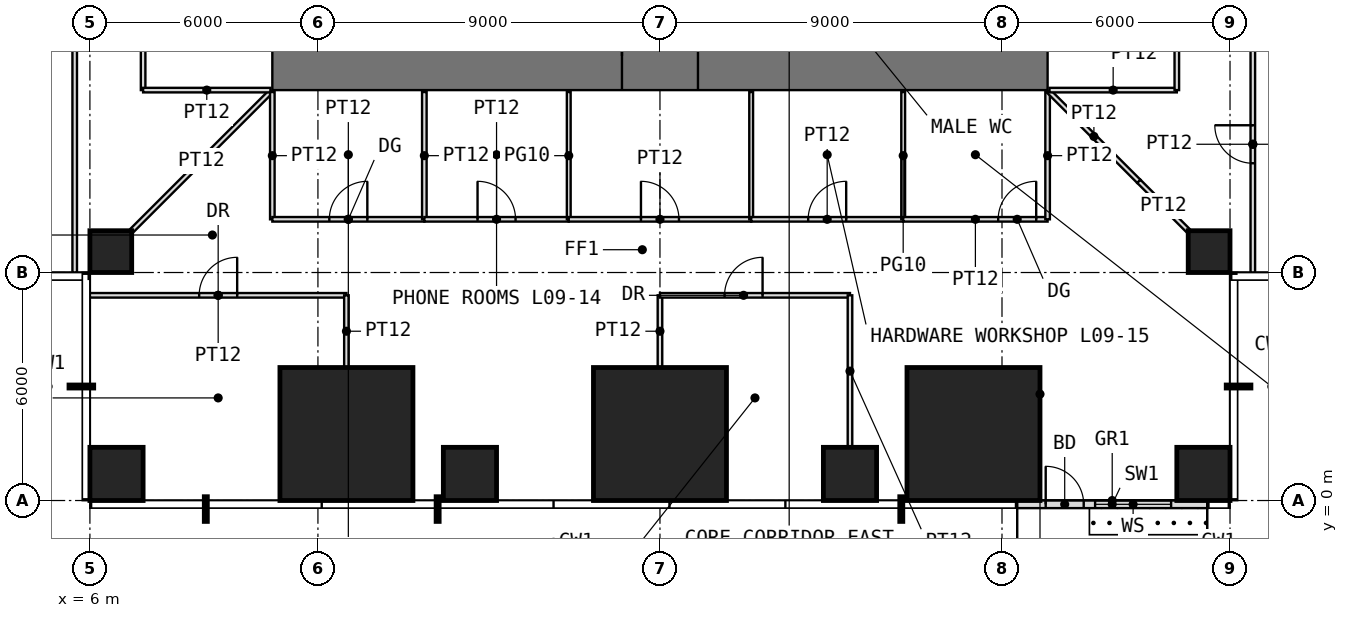
"""IFC4 building model, lengths in metres.
Left out: names, types, materials, properties, quantities, classifications, styles, units other than length and angle.
Written with IfcOpenShell. Run it as: python <this file> out.ifc"""

import sys

from ifc_helpers import new_model, si_unit, direction, frame, frame_2d, origin, origin_2d, place, context, subcontext, project, spatial, rectangle, extrude, element, fill, save


model = new_model("IFC4")
c1 = context("Model", 3, precision=1e-05, world=origin(), true_north=direction((0.0, 1.0)))
c2 = subcontext(c1, "Body", "Model", "MODEL_VIEW")
j1 = project(units=[si_unit("LENGTHUNIT", "METRE"), si_unit("PLANEANGLEUNIT", "RADIAN")], contexts=[c1])
p1 = place(None, origin())
s1 = spatial("IfcSite", under=j1, at=p1, CompositionType="ELEMENT")
p2 = place(p1, origin())
s2 = spatial("IfcBuilding", under=s1, at=p2, CompositionType="ELEMENT")
p3 = place(p2, frame((0.0, 0.0, 42.5)))
s3 = spatial("IfcBuildingStorey", under=s2, at=p3, CompositionType="ELEMENT", Elevation=42.5)
p4 = place(p3, frame((6.7, 0.7, 0.0), z_axis=(0.0, 0.0, 1.0), x_axis=(1.0, 0.0, 0.0)))
e1 = element("IfcColumn", 1, at=p4, inside=s3, PredefinedType="COLUMN", context=c2, shape_type="SweptSolid", body=[
    extrude(rectangle(XDim=1.4, YDim=1.4, at=origin_2d()), origin(), (0.0, 0.0, 1.0), 4.0),
])
p5 = place(p3, frame((12.75, 1.75, 0.0), z_axis=(0.0, 0.0, 1.0), x_axis=(1.0, 0.0, 0.0)))
e2 = element("IfcColumn", 2, at=p5, inside=s3, PredefinedType="COLUMN", context=c2, shape_type="SweptSolid", body=[
    extrude(rectangle(XDim=3.5, YDim=3.5, at=origin_2d()), origin(), (0.0, 0.0, 1.0), 4.0),
])
p6 = place(p3, frame((16.0, 0.7, 0.0), z_axis=(0.0, 0.0, 1.0), x_axis=(1.0, 0.0, 0.0)))
e3 = element("IfcColumn", 3, at=p6, inside=s3, PredefinedType="COLUMN", context=c2, shape_type="SweptSolid", body=[
    extrude(rectangle(XDim=1.4, YDim=1.4, at=origin_2d()), origin(), (0.0, 0.0, 1.0), 4.0),
])
p7 = place(p3, frame((21.0, 1.75, 0.0), z_axis=(0.0, 0.0, 1.0), x_axis=(1.0, 0.0, 0.0)))
e4 = element("IfcColumn", 4, at=p7, inside=s3, PredefinedType="COLUMN", context=c2, shape_type="SweptSolid", body=[
    extrude(rectangle(XDim=3.5, YDim=3.5, at=origin_2d()), origin(), (0.0, 0.0, 1.0), 4.0),
])
p8 = place(p3, frame((26.0, 0.7, 0.0), z_axis=(0.0, 0.0, 1.0), x_axis=(1.0, 0.0, 0.0)))
e5 = element("IfcColumn", 5, at=p8, inside=s3, PredefinedType="COLUMN", context=c2, shape_type="SweptSolid", body=[
    extrude(rectangle(XDim=1.4, YDim=1.4, at=origin_2d()), origin(), (0.0, 0.0, 1.0), 4.0),
])
p9 = place(p3, frame((29.25, 1.75, 0.0), z_axis=(0.0, 0.0, 1.0), x_axis=(1.0, 0.0, 0.0)))
e6 = element("IfcColumn", 6, at=p9, inside=s3, PredefinedType="COLUMN", context=c2, shape_type="SweptSolid", body=[
    extrude(rectangle(XDim=3.5, YDim=3.5, at=origin_2d()), origin(), (0.0, 0.0, 1.0), 4.0),
])
p10 = place(p3, frame((35.3, 0.7, 0.0), z_axis=(0.0, 0.0, 1.0), x_axis=(1.0, 0.0, 0.0)))
e7 = element("IfcColumn", 7, at=p10, inside=s3, PredefinedType="COLUMN", context=c2, shape_type="SweptSolid", body=[
    extrude(rectangle(XDim=1.4, YDim=1.4, at=origin_2d()), origin(), (0.0, 0.0, 1.0), 4.0),
])
for number, where, z_axis, x_axis in (
    (8, (6.55, 6.55, 0.0), (0.0, 0.0, 1.0), (1.0, 0.0, 0.0)),
    (9, (35.45, 6.55, 0.0), (0.0, 0.0, 1.0), (1.0, 0.0, 0.0)),
):
    element("IfcColumn", number, at=place(p3, frame(where, z_axis=z_axis, x_axis=x_axis)), inside=s3, PredefinedType="COLUMN", context=c2, shape_type="SweptSolid", body=[
        extrude(rectangle(XDim=1.1, YDim=1.1, at=origin_2d()), origin(), (0.0, 0.0, 1.0), 4.0),
    ])
p11 = place(p3, frame((30.4, -0.1, 0.0), z_axis=(0.0, 0.0, 1.0), x_axis=(1.0, 0.0, 0.0)))
e10 = element("IfcWall", 10, at=p11, inside=s3, PredefinedType="USERDEFINED", context=c2, shape_type="SweptSolid", body=[
    extrude(rectangle(XDim=5.0, YDim=0.2, at=frame_2d((2.5, 0.0))), origin(), (0.0, 0.0, 1.0), 3.75),
])
p12 = place(p11, frame((0.75, 0.0, 0.0)))
e11 = element("IfcOpeningElement", 11, at=p12, cuts=e10, PredefinedType="OPENING", context=c2, shape_type="SweptSolid", body=[
    extrude(rectangle(XDim=1.0, YDim=2.4, at=frame_2d((0.5, 1.2))), frame((0.0, 0.11, 0.0), z_axis=(0.0, -1.0, 0.0), x_axis=(1.0, 0.0, 0.0)), (0.0, 0.0, 1.0), 0.22),
])
p13 = place(p11, frame((2.05, 0.0, 0.3)))
e12 = element("IfcOpeningElement", 12, at=p13, cuts=e10, PredefinedType="OPENING", context=c2, shape_type="SweptSolid", body=[
    extrude(rectangle(XDim=2.0, YDim=2.7, at=frame_2d((1.0, 1.35))), frame((0.0, 0.11, 0.0), z_axis=(0.0, -1.0, 0.0), x_axis=(1.0, 0.0, 0.0)), (0.0, 0.0, 1.0), 0.22),
])
p14 = place(p3, frame((10.8, 11.7, -0.05), z_axis=(0.0, 0.0, 1.0), x_axis=(1.0, 0.0, 0.0)))
e13 = element("IfcWall", 13, at=p14, inside=s3, PredefinedType="SHEAR", context=c2, shape_type="SweptSolid", body=[
    extrude(rectangle(XDim=20.4, YDim=1.8, at=frame_2d((10.2, 0.0))), origin(), (0.0, 0.0, 1.0), 4.0),
])
p15 = place(p14, frame((9.2, 0.0, 0.05)))
e14 = element("IfcOpeningElement", 14, at=p15, cuts=e13, PredefinedType="OPENING", context=c2, shape_type="SweptSolid", body=[
    extrude(rectangle(XDim=2.0, YDim=2.2, at=frame_2d((1.0, 1.1))), frame((0.0, 0.91, 0.0), z_axis=(0.0, -1.0, 0.0), x_axis=(1.0, 0.0, 0.0)), (0.0, 0.0, 1.0), 1.82),
])
p16 = place(p3, frame((5.6, 6.0, 0.0), z_axis=(0.0, 0.0, 1.0), x_axis=(0.0, 1.0, 0.0)))
e15 = element("IfcWall", 15, at=p16, inside=s3, PredefinedType="PARTITIONING", context=c2, shape_type="SweptSolid", body=[
    extrude(rectangle(XDim=30.0, YDim=0.12, at=frame_2d((15.0, 0.0))), origin(), (0.0, 0.0, 1.0), 3.75),
])
p17 = place(p16, frame((14.5, 0.0, 0.0)))
e16 = element("IfcOpeningElement", 16, at=p17, cuts=e15, PredefinedType="OPENING", context=c2, shape_type="SweptSolid", body=[
    extrude(rectangle(XDim=1.0, YDim=2.4, at=frame_2d((0.5, 1.2))), frame((0.0, 0.07, 0.0), z_axis=(0.0, -1.0, 0.0), x_axis=(1.0, 0.0, 0.0)), (0.0, 0.0, 1.0), 0.14),
])
p18 = place(p3, frame((6.0, 5.4, 0.0), z_axis=(0.0, 0.0, 1.0), x_axis=(1.0, 0.0, 0.0)))
e17 = element("IfcWall", 17, at=p18, inside=s3, PredefinedType="PARTITIONING", context=c2, shape_type="SweptSolid", body=[
    extrude(rectangle(XDim=6.75, YDim=0.12, at=frame_2d((3.375, 0.0))), origin(), (0.0, 0.0, 1.0), 3.75),
])
p19 = place(p18, frame((2.875, 0.0, 0.0)))
e18 = element("IfcOpeningElement", 18, at=p19, cuts=e17, PredefinedType="OPENING", context=c2, shape_type="SweptSolid", body=[
    extrude(rectangle(XDim=1.0, YDim=2.2, at=frame_2d((0.5, 1.1))), frame((0.0, 0.07, 0.0), z_axis=(0.0, -1.0, 0.0), x_axis=(1.0, 0.0, 0.0)), (0.0, 0.0, 1.0), 0.14),
])
p20 = place(p3, frame((7.11, 7.11, 0.0), z_axis=(0.0, 0.0, 1.0), x_axis=(0.707106781187, 0.707106781187, 0.0)))
e19 = element("IfcWall", 19, at=p20, inside=s3, PredefinedType="PARTITIONING", context=c2, shape_type="SweptSolid", body=[
    extrude(rectangle(XDim=5.168, YDim=0.12, at=frame_2d((2.584, 0.0))), origin(), (0.0, 0.0, 1.0), 3.75),
])
p21 = place(p3, frame((7.4, 10.8, 0.0), z_axis=(0.0, 0.0, 1.0), x_axis=(0.0, 1.0, 0.0)))
e20 = element("IfcWall", 20, at=p21, inside=s3, PredefinedType="PARTITIONING", context=c2, shape_type="SweptSolid", body=[
    extrude(rectangle(XDim=4.8, YDim=0.12, at=frame_2d((2.4, 0.0))), origin(), (0.0, 0.0, 1.0), 3.75),
])
p22 = place(p21, frame((1.9, 0.0, 0.0)))
e21 = element("IfcOpeningElement", 21, at=p22, cuts=e20, PredefinedType="OPENING", context=c2, shape_type="SweptSolid", body=[
    extrude(rectangle(XDim=1.0, YDim=2.4, at=frame_2d((0.5, 1.2))), frame((0.0, 0.07, 0.0), z_axis=(0.0, -1.0, 0.0), x_axis=(1.0, 0.0, 0.0)), (0.0, 0.0, 1.0), 0.14),
])
for number, where, z_axis, x_axis in (
    (22, (7.4, 10.8, 0.0), (0.0, 0.0, 1.0), (1.0, 0.0, 0.0)),
    (23, (10.8, 7.4, 0.0), (0.0, 0.0, 1.0), (0.0, 1.0, 0.0)),
):
    element("IfcWall", number, at=place(p3, frame(where, z_axis=z_axis, x_axis=x_axis)), inside=s3, PredefinedType="PARTITIONING", context=c2, shape_type="SweptSolid", body=[
        extrude(rectangle(XDim=3.35, YDim=0.12, at=frame_2d((1.675, 0.0))), origin(), (0.0, 0.0, 1.0), 3.75),
    ])
p23 = place(p3, frame((10.8, 7.4, 0.0), z_axis=(0.0, 0.0, 1.0), x_axis=(1.0, 0.0, 0.0)))
e24 = element("IfcWall", 24, at=p23, inside=s3, PredefinedType="PARTITIONING", context=c2, shape_type="SweptSolid", body=[
    extrude(rectangle(XDim=4.0, YDim=0.12, at=frame_2d((2.0, 0.0))), origin(), (0.0, 0.0, 1.0), 3.75),
])
p24 = place(p23, frame((1.5, 0.0, 0.0)))
e25 = element("IfcOpeningElement", 25, at=p24, cuts=e24, PredefinedType="OPENING", context=c2, shape_type="SweptSolid", body=[
    extrude(rectangle(XDim=1.0, YDim=2.4, at=frame_2d((0.5, 1.2))), frame((0.0, 0.07, 0.0), z_axis=(0.0, -1.0, 0.0), x_axis=(1.0, 0.0, 0.0)), (0.0, 0.0, 1.0), 0.14),
])
p25 = place(p3, frame((12.75, 3.51, 0.0), z_axis=(0.0, 0.0, 1.0), x_axis=(0.0, 1.0, 0.0)))
e26 = element("IfcWall", 26, at=p25, inside=s3, PredefinedType="PARTITIONING", context=c2, shape_type="SweptSolid", body=[
    extrude(rectangle(XDim=1.89, YDim=0.12, at=frame_2d((0.945, 0.0))), origin(), (0.0, 0.0, 1.0), 3.75),
])
p26 = place(p3, frame((14.8, 7.4, 0.0), z_axis=(0.0, 0.0, 1.0), x_axis=(0.0, 1.0, 0.0)))
e27 = element("IfcWall", 27, at=p26, inside=s3, PredefinedType="PARTITIONING", context=c2, shape_type="SweptSolid", body=[
    extrude(rectangle(XDim=3.35, YDim=0.12, at=frame_2d((1.675, 0.0))), origin(), (0.0, 0.0, 1.0), 3.75),
])
p27 = place(p3, frame((14.8, 7.4, 0.0), z_axis=(0.0, 0.0, 1.0), x_axis=(1.0, 0.0, 0.0)))
e28 = element("IfcWall", 28, at=p27, inside=s3, PredefinedType="PARTITIONING", context=c2, shape_type="SweptSolid", body=[
    extrude(rectangle(XDim=3.8, YDim=0.12, at=frame_2d((1.9, 0.0))), origin(), (0.0, 0.0, 1.0), 3.75),
])
p28 = place(p27, frame((1.4, 0.0, 0.0)))
e29 = element("IfcOpeningElement", 29, at=p28, cuts=e28, PredefinedType="OPENING", context=c2, shape_type="SweptSolid", body=[
    extrude(rectangle(XDim=1.0, YDim=2.4, at=frame_2d((0.5, 1.2))), frame((0.0, 0.07, 0.0), z_axis=(0.0, -1.0, 0.0), x_axis=(1.0, 0.0, 0.0)), (0.0, 0.0, 1.0), 0.14),
])
p29 = place(p3, frame((18.6, 7.4, 0.0), z_axis=(0.0, 0.0, 1.0), x_axis=(0.0, 1.0, 0.0)))
e30 = element("IfcWall", 30, at=p29, inside=s3, PredefinedType="PARTITIONING", context=c2, shape_type="SweptSolid", body=[
    extrude(rectangle(XDim=3.35, YDim=0.1, at=frame_2d((1.675, 0.0))), origin(), (0.0, 0.0, 1.0), 3.75),
])
p30 = place(p3, frame((18.6, 7.4, 0.0), z_axis=(0.0, 0.0, 1.0), x_axis=(1.0, 0.0, 0.0)))
e31 = element("IfcWall", 31, at=p30, inside=s3, PredefinedType="PARTITIONING", context=c2, shape_type="SweptSolid", body=[
    extrude(rectangle(XDim=4.8, YDim=0.12, at=frame_2d((2.4, 0.0))), origin(), (0.0, 0.0, 1.0), 3.75),
])
p31 = place(p30, frame((1.9, 0.0, 0.0)))
e32 = element("IfcOpeningElement", 32, at=p31, cuts=e31, PredefinedType="OPENING", context=c2, shape_type="SweptSolid", body=[
    extrude(rectangle(XDim=1.0, YDim=2.4, at=frame_2d((0.5, 1.2))), frame((0.0, 0.07, 0.0), z_axis=(0.0, -1.0, 0.0), x_axis=(1.0, 0.0, 0.0)), (0.0, 0.0, 1.0), 0.14),
])
p32 = place(p3, frame((21.0, 3.51, 0.0), z_axis=(0.0, 0.0, 1.0), x_axis=(0.0, 1.0, 0.0)))
e33 = element("IfcWall", 33, at=p32, inside=s3, PredefinedType="PARTITIONING", context=c2, shape_type="SweptSolid", body=[
    extrude(rectangle(XDim=1.89, YDim=0.12, at=frame_2d((0.945, 0.0))), origin(), (0.0, 0.0, 1.0), 3.75),
])
p33 = place(p3, frame((21.0, 5.4, 0.0), z_axis=(0.0, 0.0, 1.0), x_axis=(1.0, 0.0, 0.0)))
e34 = element("IfcWall", 34, at=p33, inside=s3, PredefinedType="PARTITIONING", context=c2, shape_type="SweptSolid", body=[
    extrude(rectangle(XDim=5.0, YDim=0.12, at=frame_2d((2.5, 0.0))), origin(), (0.0, 0.0, 1.0), 3.75),
])
p34 = place(p33, frame((1.7, 0.0, 0.0)))
e35 = element("IfcOpeningElement", 35, at=p34, cuts=e34, PredefinedType="OPENING", context=c2, shape_type="SweptSolid", body=[
    extrude(rectangle(XDim=1.0, YDim=2.2, at=frame_2d((0.5, 1.1))), frame((0.0, 0.07, 0.0), z_axis=(0.0, -1.0, 0.0), x_axis=(1.0, 0.0, 0.0)), (0.0, 0.0, 1.0), 0.14),
])
p35 = place(p3, frame((23.4, 7.4, 0.0), z_axis=(0.0, 0.0, 1.0), x_axis=(0.0, 1.0, 0.0)))
e36 = element("IfcWall", 36, at=p35, inside=s3, PredefinedType="PARTITIONING", context=c2, shape_type="SweptSolid", body=[
    extrude(rectangle(XDim=3.35, YDim=0.1, at=frame_2d((1.675, 0.0))), origin(), (0.0, 0.0, 1.0), 3.75),
])
p36 = place(p3, frame((23.4, 7.4, 0.0), z_axis=(0.0, 0.0, 1.0), x_axis=(1.0, 0.0, 0.0)))
e37 = element("IfcWall", 37, at=p36, inside=s3, PredefinedType="PARTITIONING", context=c2, shape_type="SweptSolid", body=[
    extrude(rectangle(XDim=4.0, YDim=0.12, at=frame_2d((2.0, 0.0))), origin(), (0.0, 0.0, 1.0), 3.75),
])
p37 = place(p36, frame((1.5, 0.0, 0.0)))
e38 = element("IfcOpeningElement", 38, at=p37, cuts=e37, PredefinedType="OPENING", context=c2, shape_type="SweptSolid", body=[
    extrude(rectangle(XDim=1.0, YDim=2.4, at=frame_2d((0.5, 1.2))), frame((0.0, 0.07, 0.0), z_axis=(0.0, -1.0, 0.0), x_axis=(1.0, 0.0, 0.0)), (0.0, 0.0, 1.0), 0.14),
])
p38 = place(p3, frame((26.0, 1.41, 0.0), z_axis=(0.0, 0.0, 1.0), x_axis=(0.0, 1.0, 0.0)))
e39 = element("IfcWall", 39, at=p38, inside=s3, PredefinedType="PARTITIONING", context=c2, shape_type="SweptSolid", body=[
    extrude(rectangle(XDim=3.99, YDim=0.12, at=frame_2d((1.995, 0.0))), origin(), (0.0, 0.0, 1.0), 3.75),
])
p39 = place(p3, frame((27.4, 7.4, 0.0), z_axis=(0.0, 0.0, 1.0), x_axis=(0.0, 1.0, 0.0)))
e40 = element("IfcWall", 40, at=p39, inside=s3, PredefinedType="PARTITIONING", context=c2, shape_type="SweptSolid", body=[
    extrude(rectangle(XDim=3.35, YDim=0.1, at=frame_2d((1.675, 0.0))), origin(), (0.0, 0.0, 1.0), 3.75),
])
p40 = place(p3, frame((27.4, 7.4, 0.0), z_axis=(0.0, 0.0, 1.0), x_axis=(1.0, 0.0, 0.0)))
e41 = element("IfcWall", 41, at=p40, inside=s3, PredefinedType="PARTITIONING", context=c2, shape_type="SweptSolid", body=[
    extrude(rectangle(XDim=3.8, YDim=0.12, at=frame_2d((1.9, 0.0))), origin(), (0.0, 0.0, 1.0), 3.75),
])
p41 = place(p40, frame((2.5, 0.0, 0.0)))
e42 = element("IfcOpeningElement", 42, at=p41, cuts=e41, PredefinedType="OPENING", context=c2, shape_type="SweptSolid", body=[
    extrude(rectangle(XDim=1.0, YDim=2.4, at=frame_2d((0.5, 1.2))), frame((0.0, 0.07, 0.0), z_axis=(0.0, -1.0, 0.0), x_axis=(1.0, 0.0, 0.0)), (0.0, 0.0, 1.0), 0.14),
])
p42 = place(p3, frame((31.2, 7.4, 0.0), z_axis=(0.0, 0.0, 1.0), x_axis=(0.0, 1.0, 0.0)))
e43 = element("IfcWall", 43, at=p42, inside=s3, PredefinedType="PARTITIONING", context=c2, shape_type="SweptSolid", body=[
    extrude(rectangle(XDim=3.35, YDim=0.12, at=frame_2d((1.675, 0.0))), origin(), (0.0, 0.0, 1.0), 3.75),
])
p43 = place(p3, frame((31.235, 10.765, 0.0), z_axis=(0.0, 0.0, 1.0), x_axis=(0.707106781187, -0.707106781187, 0.0)))
e44 = element("IfcWall", 44, at=p43, inside=s3, PredefinedType="PARTITIONING", context=c2, shape_type="SweptSolid", body=[
    extrude(rectangle(XDim=3.346, YDim=0.12, at=frame_2d((1.673, 0.0))), origin(), (0.0, 0.0, 1.0), 3.75),
])
p44 = place(p3, frame((31.25, 10.8, 0.0), z_axis=(0.0, 0.0, 1.0), x_axis=(1.0, 0.0, 0.0)))
e45 = element("IfcWall", 45, at=p44, inside=s3, PredefinedType="PARTITIONING", context=c2, shape_type="SweptSolid", body=[
    extrude(rectangle(XDim=3.35, YDim=0.12, at=frame_2d((1.675, 0.0))), origin(), (0.0, 0.0, 1.0), 3.75),
])
p45 = place(p3, frame((33.602, 8.398, 0.0), z_axis=(0.0, 0.0, 1.0), x_axis=(0.707106781187, -0.707106781187, 0.0)))
e46 = element("IfcWall", 46, at=p45, inside=s3, PredefinedType="PARTITIONING", context=c2, shape_type="SweptSolid", body=[
    extrude(rectangle(XDim=1.822, YDim=0.12, at=frame_2d((0.911, 0.0))), origin(), (0.0, 0.0, 1.0), 3.75),
])
p46 = place(p3, frame((34.6, 10.8, 0.0), z_axis=(0.0, 0.0, 1.0), x_axis=(0.0, 1.0, 0.0)))
e47 = element("IfcWall", 47, at=p46, inside=s3, PredefinedType="PARTITIONING", context=c2, shape_type="SweptSolid", body=[
    extrude(rectangle(XDim=6.6, YDim=0.12, at=frame_2d((3.3, 0.0))), origin(), (0.0, 0.0, 1.0), 3.75),
])
p47 = place(p46, frame((2.8, 0.0, 0.0)))
e48 = element("IfcOpeningElement", 48, at=p47, cuts=e47, PredefinedType="OPENING", context=c2, shape_type="SweptSolid", body=[
    extrude(rectangle(XDim=1.0, YDim=2.4, at=frame_2d((0.5, 1.2))), frame((0.0, 0.07, 0.0), z_axis=(0.0, -1.0, 0.0), x_axis=(1.0, 0.0, 0.0)), (0.0, 0.0, 1.0), 0.14),
])
p48 = place(p3, frame((36.6, 6.0, 0.0), z_axis=(0.0, 0.0, 1.0), x_axis=(0.0, 1.0, 0.0)))
e49 = element("IfcWall", 49, at=p48, inside=s3, PredefinedType="PARTITIONING", context=c2, shape_type="SweptSolid", body=[
    extrude(rectangle(XDim=6.75, YDim=0.12, at=frame_2d((3.375, 0.0))), origin(), (0.0, 0.0, 1.0), 3.75),
])
p49 = place(p48, frame((2.875, 0.0, 0.0)))
e50 = element("IfcOpeningElement", 50, at=p49, cuts=e49, PredefinedType="OPENING", context=c2, shape_type="SweptSolid", body=[
    extrude(rectangle(XDim=1.0, YDim=2.4, at=frame_2d((0.5, 1.2))), frame((0.0, 0.07, 0.0), z_axis=(0.0, -1.0, 0.0), x_axis=(1.0, 0.0, 0.0)), (0.0, 0.0, 1.0), 0.14),
])
p50 = place(p12, origin())
e51 = element("IfcDoor", 51, at=p50, inside=s3, OperationType="SINGLE_SWING_LEFT", PredefinedType="DOOR", context=c2, shape_type="SweptSolid", body=[
    extrude(rectangle(XDim=1.0, YDim=2.4, at=frame_2d((0.5, 1.2))), frame((0.0, 0.025, 0.0), z_axis=(0.0, -1.0, 0.0), x_axis=(1.0, 0.0, 0.0)), (0.0, 0.0, 1.0), 0.05),
])
fill(e11, e51)
p51 = place(p13, origin())
e52 = element("IfcWindow", 52, at=p51, inside=s3, PartitioningType="SINGLE_PANEL", PredefinedType="WINDOW", context=c2, shape_type="SweptSolid", body=[
    extrude(rectangle(XDim=2.0, YDim=2.7, at=frame_2d((1.0, 1.35))), frame((0.0, 0.03, 0.0), z_axis=(0.0, -1.0, 0.0), x_axis=(1.0, 0.0, 0.0)), (0.0, 0.0, 1.0), 0.06),
])
fill(e12, e52)
p52 = place(p15, origin())
e53 = element("IfcDoor", 53, at=p52, inside=s3, OperationType="DOUBLE_DOOR_SINGLE_SWING", PredefinedType="DOOR", context=c2, shape_type="SweptSolid", body=[
    extrude(rectangle(XDim=2.0, YDim=2.2, at=frame_2d((1.0, 1.1))), frame((0.0, 0.025, 0.0), z_axis=(0.0, -1.0, 0.0), x_axis=(1.0, 0.0, 0.0)), (0.0, 0.0, 1.0), 0.05),
])
fill(e14, e53)
p53 = place(p24, origin())
e54 = element("IfcDoor", 54, at=p53, inside=s3, OperationType="SINGLE_SWING_RIGHT", PredefinedType="DOOR", context=c2, shape_type="SweptSolid", body=[
    extrude(rectangle(XDim=1.0, YDim=2.4, at=frame_2d((0.5, 1.2))), frame((0.0, 0.025, 0.0), z_axis=(0.0, -1.0, 0.0), x_axis=(1.0, 0.0, 0.0)), (0.0, 0.0, 1.0), 0.05),
])
fill(e25, e54)
p54 = place(p28, origin())
e55 = element("IfcDoor", 55, at=p54, inside=s3, OperationType="SINGLE_SWING_LEFT", PredefinedType="DOOR", context=c2, shape_type="SweptSolid", body=[
    extrude(rectangle(XDim=1.0, YDim=2.4, at=frame_2d((0.5, 1.2))), frame((0.0, 0.025, 0.0), z_axis=(0.0, -1.0, 0.0), x_axis=(1.0, 0.0, 0.0)), (0.0, 0.0, 1.0), 0.05),
])
fill(e29, e55)
p55 = place(p37, origin())
e56 = element("IfcDoor", 56, at=p55, inside=s3, OperationType="SINGLE_SWING_RIGHT", PredefinedType="DOOR", context=c2, shape_type="SweptSolid", body=[
    extrude(rectangle(XDim=1.0, YDim=2.4, at=frame_2d((0.5, 1.2))), frame((0.0, 0.025, 0.0), z_axis=(0.0, -1.0, 0.0), x_axis=(1.0, 0.0, 0.0)), (0.0, 0.0, 1.0), 0.05),
])
fill(e38, e56)
p56 = place(p19, origin())
e57 = element("IfcDoor", 57, at=p56, inside=s3, OperationType="SINGLE_SWING_RIGHT", PredefinedType="DOOR", context=c2, shape_type="SweptSolid", body=[
    extrude(rectangle(XDim=1.0, YDim=2.2, at=frame_2d((0.5, 1.1))), frame((0.0, 0.025, 0.0), z_axis=(0.0, -1.0, 0.0), x_axis=(1.0, 0.0, 0.0)), (0.0, 0.0, 1.0), 0.05),
])
fill(e18, e57)
p57 = place(p34, origin())
e58 = element("IfcDoor", 58, at=p57, inside=s3, OperationType="SINGLE_SWING_RIGHT", PredefinedType="DOOR", context=c2, shape_type="SweptSolid", body=[
    extrude(rectangle(XDim=1.0, YDim=2.2, at=frame_2d((0.5, 1.1))), frame((0.0, 0.025, 0.0), z_axis=(0.0, -1.0, 0.0), x_axis=(1.0, 0.0, 0.0)), (0.0, 0.0, 1.0), 0.05),
])
fill(e35, e58)
p58 = place(p49, origin())
e59 = element("IfcDoor", 59, at=p58, inside=s3, OperationType="SINGLE_SWING_RIGHT", PredefinedType="DOOR", context=c2, shape_type="SweptSolid", body=[
    extrude(rectangle(XDim=1.0, YDim=2.4, at=frame_2d((0.5, 1.2))), frame((0.0, 0.025, 0.0), z_axis=(0.0, -1.0, 0.0), x_axis=(1.0, 0.0, 0.0)), (0.0, 0.0, 1.0), 0.05),
])
fill(e50, e59)
p59 = place(p31, origin())
e60 = element("IfcDoor", 60, at=p59, inside=s3, OperationType="SINGLE_SWING_LEFT", PredefinedType="DOOR", context=c2, shape_type="SweptSolid", body=[
    extrude(rectangle(XDim=1.0, YDim=2.4, at=frame_2d((0.5, 1.2))), frame((0.0, 0.025, 0.0), z_axis=(0.0, -1.0, 0.0), x_axis=(1.0, 0.0, 0.0)), (0.0, 0.0, 1.0), 0.05),
])
fill(e32, e60)
p60 = place(p41, origin())
e61 = element("IfcDoor", 61, at=p60, inside=s3, OperationType="SINGLE_SWING_RIGHT", PredefinedType="DOOR", context=c2, shape_type="SweptSolid", body=[
    extrude(rectangle(XDim=1.0, YDim=2.4, at=frame_2d((0.5, 1.2))), frame((0.0, 0.025, 0.0), z_axis=(0.0, -1.0, 0.0), x_axis=(1.0, 0.0, 0.0)), (0.0, 0.0, 1.0), 0.05),
])
fill(e42, e61)
save(model, sys.argv[1])
